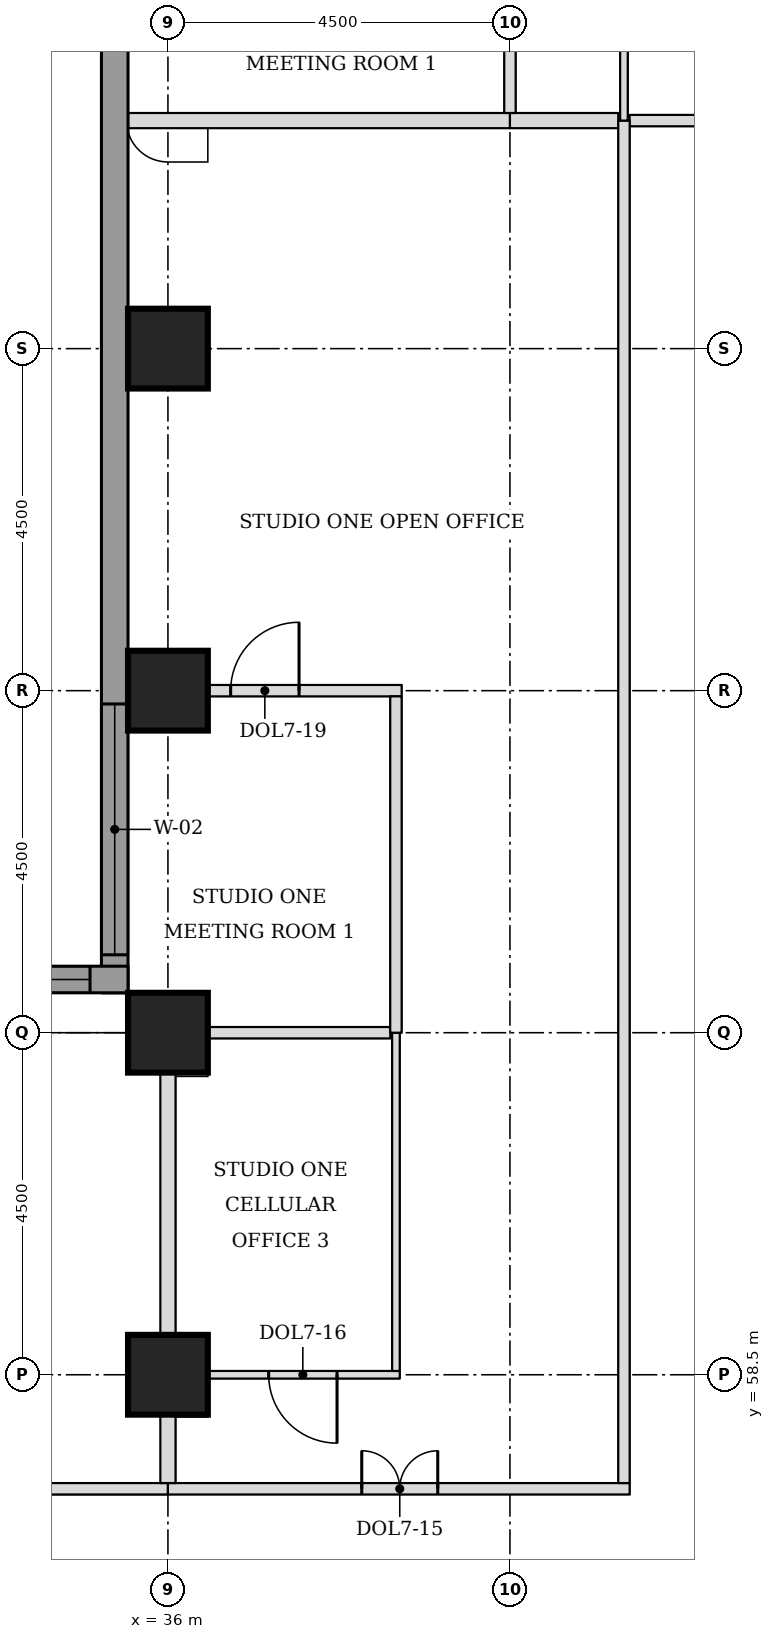
"""IFC4 building model, lengths in metres.
Left out: names, types, materials, properties, quantities, classifications, styles, units other than length and angle.
Written with IfcOpenShell. Run it as: python <this file> out.ifc"""

import sys

from ifc_helpers import new_model, si_unit, direction, frame, frame_2d, origin, origin_2d, place, context, subcontext, project, spatial, rectangle, extrude, element, fill, save


model = new_model("IFC4")
c1 = context("Model", 3, precision=1e-05, world=origin(), true_north=direction((0.0, 1.0)))
c2 = subcontext(c1, "Body", "Model", "MODEL_VIEW")
j1 = project(units=[si_unit("LENGTHUNIT", "METRE"), si_unit("PLANEANGLEUNIT", "RADIAN")], contexts=[c1])
p1 = place(None, origin())
s1 = spatial("IfcSite", under=j1, at=p1, CompositionType="ELEMENT")
p2 = place(p1, origin())
s2 = spatial("IfcBuilding", under=s1, at=p2, CompositionType="ELEMENT")
p3 = place(p2, frame((0.0, 0.0, 134.4)))
s3 = spatial("IfcBuildingStorey", under=s2, at=p3, CompositionType="ELEMENT", Elevation=134.4)
for number, where, z_axis, x_axis in (
    (1, (36.0, 58.5, 0.0), (0.0, 0.0, 1.0), (1.0, 0.0, 0.0)),
    (2, (36.0, 63.0, 0.0), (0.0, 0.0, 1.0), (1.0, 0.0, 0.0)),
    (3, (36.0, 67.5, 0.0), (0.0, 0.0, 1.0), (1.0, 0.0, 0.0)),
    (4, (36.0, 72.0, 0.0), (0.0, 0.0, 1.0), (1.0, 0.0, 0.0)),
):
    element("IfcColumn", number, at=place(p3, frame(where, z_axis=z_axis, x_axis=x_axis)), inside=s3, PredefinedType="COLUMN", context=c2, shape_type="SweptSolid", body=[
        extrude(rectangle(XDim=1.05, YDim=1.05, at=origin_2d()), origin(), (0.0, 0.0, 1.0), 3.7),
    ])
p4 = place(p3, frame((35.3, 76.862, 0.0), z_axis=(0.0, 0.0, 1.0), x_axis=(0.0, -1.0, 0.0)))
e5 = element("IfcWall", 5, at=p4, inside=s3, PredefinedType="STANDARD", context=c2, shape_type="SweptSolid", body=[
    extrude(rectangle(XDim=13.337, YDim=0.35, at=frame_2d((6.669, 0.0))), origin(), (0.0, 0.0, 1.0), 3.525),
])
p5 = place(p4, frame((9.537, 0.0, 0.9)))
e6 = element("IfcOpeningElement", 6, at=p5, cuts=e5, PredefinedType="OPENING", context=c2, shape_type="SweptSolid", body=[
    extrude(rectangle(XDim=3.3, YDim=1.9, at=frame_2d((1.65, 0.95))), frame((0.0, 0.185, 0.0), z_axis=(0.0, -1.0, 0.0), x_axis=(1.0, 0.0, 0.0)), (0.0, 0.0, 1.0), 0.37),
])
p6 = place(p3, frame((35.475, 63.7, 0.0), z_axis=(0.0, 0.0, 1.0), x_axis=(-1.0, 0.0, 0.0)))
e7 = element("IfcWall", 7, at=p6, inside=s3, PredefinedType="STANDARD", context=c2, shape_type="SweptSolid", body=[
    extrude(rectangle(XDim=17.837, YDim=0.35, at=frame_2d((8.919, 0.0))), origin(), (0.0, 0.0, 1.0), 3.525),
])
p7 = place(p6, frame((0.5, 0.0, 0.9)))
e8 = element("IfcOpeningElement", 8, at=p7, cuts=e7, PredefinedType="OPENING", context=c2, shape_type="SweptSolid", body=[
    extrude(rectangle(XDim=3.3, YDim=1.9, at=frame_2d((1.65, 0.95))), frame((0.0, 0.185, 0.0), z_axis=(0.0, -1.0, 0.0), x_axis=(1.0, 0.0, 0.0)), (0.0, 0.0, 1.0), 0.37),
])
p8 = place(p6, frame((9.075, 0.0, 0.9)))
e9 = element("IfcOpeningElement", 9, at=p8, cuts=e7, PredefinedType="OPENING", context=c2, shape_type="SweptSolid", body=[
    extrude(rectangle(XDim=3.3, YDim=1.9, at=frame_2d((1.65, 0.95))), frame((0.0, 0.185, 0.0), z_axis=(0.0, -1.0, 0.0), x_axis=(1.0, 0.0, 0.0)), (0.0, 0.0, 1.0), 0.37),
])
p9 = place(p3, frame((29.38, 57.0, 0.0), z_axis=(0.0, 0.0, 1.0), x_axis=(1.0, 0.0, 0.0)))
e10 = element("IfcWall", 10, at=p9, inside=s3, PredefinedType="PARTITIONING", context=c2, shape_type="SweptSolid", body=[
    extrude(rectangle(XDim=6.62, YDim=0.15, at=frame_2d((3.31, 0.0))), origin(), (0.0, 0.0, 1.0), 3.55),
])
p10 = place(p9, frame((2.88, 0.0, 0.0)))
e11 = element("IfcOpeningElement", 11, at=p10, cuts=e10, PredefinedType="OPENING", context=c2, shape_type="SweptSolid", body=[
    extrude(rectangle(XDim=1.0, YDim=2.1, at=frame_2d((0.5, 1.05))), frame((0.0, 0.085, 0.0), z_axis=(0.0, -1.0, 0.0), x_axis=(1.0, 0.0, 0.0)), (0.0, 0.0, 1.0), 0.17),
])
p11 = place(p3, frame((36.0, 57.0, 0.0), z_axis=(0.0, 0.0, 1.0), x_axis=(1.0, 0.0, 0.0)))
e12 = element("IfcWall", 12, at=p11, inside=s3, PredefinedType="PARTITIONING", context=c2, shape_type="SweptSolid", body=[
    extrude(rectangle(XDim=6.075, YDim=0.15, at=frame_2d((3.038, 0.0))), origin(), (0.0, 0.0, 1.0), 3.55),
])
p12 = place(p11, frame((2.55, 0.0, 0.0)))
e13 = element("IfcOpeningElement", 13, at=p12, cuts=e12, PredefinedType="OPENING", context=c2, shape_type="SweptSolid", body=[
    extrude(rectangle(XDim=1.0, YDim=2.1, at=frame_2d((0.5, 1.05))), frame((0.0, 0.085, 0.0), z_axis=(0.0, -1.0, 0.0), x_axis=(1.0, 0.0, 0.0)), (0.0, 0.0, 1.0), 0.17),
])
p13 = place(p3, frame((36.525, 58.5, 0.0), z_axis=(0.0, 0.0, 1.0), x_axis=(1.0, 0.0, 0.0)))
e14 = element("IfcWall", 14, at=p13, inside=s3, PredefinedType="PARTITIONING", context=c2, shape_type="SweptSolid", body=[
    extrude(rectangle(XDim=2.525, YDim=0.1, at=frame_2d((1.263, 0.0))), origin(), (0.0, 0.0, 1.0), 3.55),
])
p14 = place(p13, frame((0.8, 0.0, 0.0)))
e15 = element("IfcOpeningElement", 15, at=p14, cuts=e14, PredefinedType="OPENING", context=c2, shape_type="SweptSolid", body=[
    extrude(rectangle(XDim=0.9, YDim=2.1, at=frame_2d((0.45, 1.05))), frame((0.0, 0.06, 0.0), z_axis=(0.0, -1.0, 0.0), x_axis=(1.0, 0.0, 0.0)), (0.0, 0.0, 1.0), 0.12),
])
p15 = place(p3, frame((36.525, 63.0, 0.0), z_axis=(0.0, 0.0, 1.0), x_axis=(1.0, 0.0, 0.0)))
e16 = element("IfcWall", 16, at=p15, inside=s3, PredefinedType="PARTITIONING", context=c2, shape_type="SweptSolid", body=[
    extrude(rectangle(XDim=2.4, YDim=0.15, at=frame_2d((1.2, 0.0))), origin(), (0.0, 0.0, 1.0), 3.55),
])
p16 = place(p3, frame((35.475, 67.5, 0.0), z_axis=(0.0, 0.0, 1.0), x_axis=(1.0, 0.0, 0.0)))
e17 = element("IfcWall", 17, at=p16, inside=s3, PredefinedType="PARTITIONING", context=c2, shape_type="SweptSolid", body=[
    extrude(rectangle(XDim=3.6, YDim=0.15, at=frame_2d((1.8, 0.0))), origin(), (0.0, 0.0, 1.0), 3.55),
])
p17 = place(p16, frame((1.35, 0.0, 0.0)))
e18 = element("IfcOpeningElement", 18, at=p17, cuts=e17, PredefinedType="OPENING", context=c2, shape_type="SweptSolid", body=[
    extrude(rectangle(XDim=0.9, YDim=2.1, at=frame_2d((0.45, 1.05))), frame((0.0, 0.085, 0.0), z_axis=(0.0, -1.0, 0.0), x_axis=(1.0, 0.0, 0.0)), (0.0, 0.0, 1.0), 0.17),
])
p18 = place(p3, frame((35.475, 75.0, 0.0), z_axis=(0.0, 0.0, 1.0), x_axis=(1.0, 0.0, 0.0)))
e19 = element("IfcWall", 19, at=p18, inside=s3, PredefinedType="PARTITIONING", context=c2, shape_type="SweptSolid", body=[
    extrude(rectangle(XDim=5.025, YDim=0.2, at=frame_2d((2.512, 0.0))), origin(), (0.0, 0.0, 1.0), 3.55),
])
p19 = place(p3, frame((40.5, 75.0, 0.0), z_axis=(0.0, 0.0, 1.0), x_axis=(1.0, 0.0, 0.0)))
e20 = element("IfcWall", 20, at=p19, inside=s3, PredefinedType="PARTITIONING", context=c2, shape_type="SweptSolid", body=[
    extrude(rectangle(XDim=1.425, YDim=0.2, at=frame_2d((0.712, 0.0))), origin(), (0.0, 0.0, 1.0), 3.55),
])
p20 = place(p3, frame((42.075, 75.0, 0.0), z_axis=(0.0, 0.0, 1.0), x_axis=(1.0, 0.0, 0.0)))
e21 = element("IfcWall", 21, at=p20, inside=s3, PredefinedType="PARTITIONING", context=c2, shape_type="SweptSolid", body=[
    extrude(rectangle(XDim=4.425, YDim=0.15, at=frame_2d((2.212, 0.0))), origin(), (0.0, 0.0, 1.0), 3.55),
])
p21 = place(p20, frame((1.7, 0.0, 0.0)))
e22 = element("IfcOpeningElement", 22, at=p21, cuts=e21, PredefinedType="OPENING", context=c2, shape_type="SweptSolid", body=[
    extrude(rectangle(XDim=1.0, YDim=2.1, at=frame_2d((0.5, 1.05))), frame((0.0, 0.085, 0.0), z_axis=(0.0, -1.0, 0.0), x_axis=(1.0, 0.0, 0.0)), (0.0, 0.0, 1.0), 0.17),
])
p22 = place(p3, frame((36.0, 57.075, 0.0), z_axis=(0.0, 0.0, 1.0), x_axis=(0.0, 1.0, 0.0)))
e23 = element("IfcWall", 23, at=p22, inside=s3, PredefinedType="PARTITIONING", context=c2, shape_type="SweptSolid", body=[
    extrude(rectangle(XDim=0.9, YDim=0.2, at=frame_2d((0.45, 0.0))), origin(), (0.0, 0.0, 1.0), 2.8),
])
p23 = place(p3, frame((42.0, 57.075, 0.0), z_axis=(0.0, 0.0, 1.0), x_axis=(0.0, 1.0, 0.0)))
e24 = element("IfcWall", 24, at=p23, inside=s3, PredefinedType="PARTITIONING", context=c2, shape_type="SweptSolid", body=[
    extrude(rectangle(XDim=17.925, YDim=0.15, at=frame_2d((8.962, 0.0))), origin(), (0.0, 0.0, 1.0), 3.55),
])
p24 = place(p3, frame((39.0, 58.55, 0.0), z_axis=(0.0, 0.0, 1.0), x_axis=(0.0, 1.0, 0.0)))
e25 = element("IfcWall", 25, at=p24, inside=s3, PredefinedType="PARTITIONING", context=c2, shape_type="SweptSolid", body=[
    extrude(rectangle(XDim=4.45, YDim=0.1, at=frame_2d((2.225, 0.0))), origin(), (0.0, 0.0, 1.0), 3.55),
])
p25 = place(p3, frame((36.0, 58.995, 0.0), z_axis=(0.0, 0.0, 1.0), x_axis=(0.0, 1.0, 0.0)))
e26 = element("IfcWall", 26, at=p25, inside=s3, PredefinedType="PARTITIONING", context=c2, shape_type="SweptSolid", body=[
    extrude(rectangle(XDim=3.48, YDim=0.2, at=frame_2d((1.74, 0.0))), origin(), (0.0, 0.0, 1.0), 2.8),
])
p26 = place(p3, frame((39.0, 63.0, 0.0), z_axis=(0.0, 0.0, 1.0), x_axis=(0.0, 1.0, 0.0)))
e27 = element("IfcWall", 27, at=p26, inside=s3, PredefinedType="PARTITIONING", context=c2, shape_type="SweptSolid", body=[
    extrude(rectangle(XDim=4.425, YDim=0.15, at=frame_2d((2.212, 0.0))), origin(), (0.0, 0.0, 1.0), 3.55),
])
p27 = place(p3, frame((42.0, 75.0, 0.0), z_axis=(0.0, 0.0, 1.0), x_axis=(0.0, 1.0, 0.0)))
e28 = element("IfcWall", 28, at=p27, inside=s3, PredefinedType="PARTITIONING", context=c2, shape_type="SweptSolid", body=[
    extrude(rectangle(XDim=2.95, YDim=0.1, at=frame_2d((1.475, 0.0))), origin(), (0.0, 0.0, 1.0), 3.55),
])
p28 = place(p3, frame((40.5, 75.1, 0.0), z_axis=(0.0, 0.0, 1.0), x_axis=(0.0, 1.0, 0.0)))
e29 = element("IfcWall", 29, at=p28, inside=s3, PredefinedType="PARTITIONING", context=c2, shape_type="SweptSolid", body=[
    extrude(rectangle(XDim=5.375, YDim=0.15, at=frame_2d((2.688, 0.0))), origin(), (0.0, 0.0, 1.0), 3.55),
])
p29 = place(p28, frame((2.25, 0.0, 0.0)))
e30 = element("IfcOpeningElement", 30, at=p29, cuts=e29, PredefinedType="OPENING", context=c2, shape_type="SweptSolid", body=[
    extrude(rectangle(XDim=0.9, YDim=2.1, at=frame_2d((0.45, 1.05))), frame((0.0, 0.085, 0.0), z_axis=(0.0, -1.0, 0.0), x_axis=(1.0, 0.0, 0.0)), (0.0, 0.0, 1.0), 0.17),
])
p30 = place(p5, origin())
e31 = element("IfcWindow", 31, at=p30, inside=s3, PartitioningType="SINGLE_PANEL", PredefinedType="WINDOW", context=c2, shape_type="SweptSolid", body=[
    extrude(rectangle(XDim=3.3, YDim=1.9, at=frame_2d((1.65, 0.95))), frame((0.0, 0.085, 0.0), z_axis=(0.0, -1.0, 0.0), x_axis=(1.0, 0.0, 0.0)), (0.0, 0.0, 1.0), 0.06),
])
fill(e6, e31)
p31 = place(p7, origin())
e32 = element("IfcWindow", 32, at=p31, inside=s3, PartitioningType="SINGLE_PANEL", PredefinedType="WINDOW", context=c2, shape_type="SweptSolid", body=[
    extrude(rectangle(XDim=3.3, YDim=1.9, at=frame_2d((1.65, 0.95))), frame((0.0, 0.085, 0.0), z_axis=(0.0, -1.0, 0.0), x_axis=(1.0, 0.0, 0.0)), (0.0, 0.0, 1.0), 0.06),
])
fill(e8, e32)
p32 = place(p12, origin())
e33 = element("IfcDoor", 33, at=p32, inside=s3, OperationType="DOUBLE_DOOR_SINGLE_SWING", PredefinedType="DOOR", context=c2, shape_type="SweptSolid", body=[
    extrude(rectangle(XDim=1.0, YDim=2.1, at=frame_2d((0.5, 1.05))), frame((0.0, 0.025, 0.0), z_axis=(0.0, -1.0, 0.0), x_axis=(1.0, 0.0, 0.0)), (0.0, 0.0, 1.0), 0.05),
])
fill(e13, e33)
p33 = place(p14, frame((0.9, 0.0, 0.0), z_axis=(0.0, 0.0, 1.0), x_axis=(-1.0, 0.0, 0.0)))
e34 = element("IfcDoor", 34, at=p33, inside=s3, OperationType="SINGLE_SWING_LEFT", PredefinedType="DOOR", context=c2, shape_type="SweptSolid", body=[
    extrude(rectangle(XDim=0.9, YDim=2.1, at=frame_2d((0.45, 1.05))), frame((0.0, 0.025, 0.0), z_axis=(0.0, -1.0, 0.0), x_axis=(1.0, 0.0, 0.0)), (0.0, 0.0, 1.0), 0.05),
])
fill(e15, e34)
p34 = place(p17, origin())
e35 = element("IfcDoor", 35, at=p34, inside=s3, OperationType="SINGLE_SWING_RIGHT", PredefinedType="DOOR", context=c2, shape_type="SweptSolid", body=[
    extrude(rectangle(XDim=0.9, YDim=2.1, at=frame_2d((0.45, 1.05))), frame((0.0, 0.025, 0.0), z_axis=(0.0, -1.0, 0.0), x_axis=(1.0, 0.0, 0.0)), (0.0, 0.0, 1.0), 0.05),
])
fill(e18, e35)
save(model, sys.argv[1])
